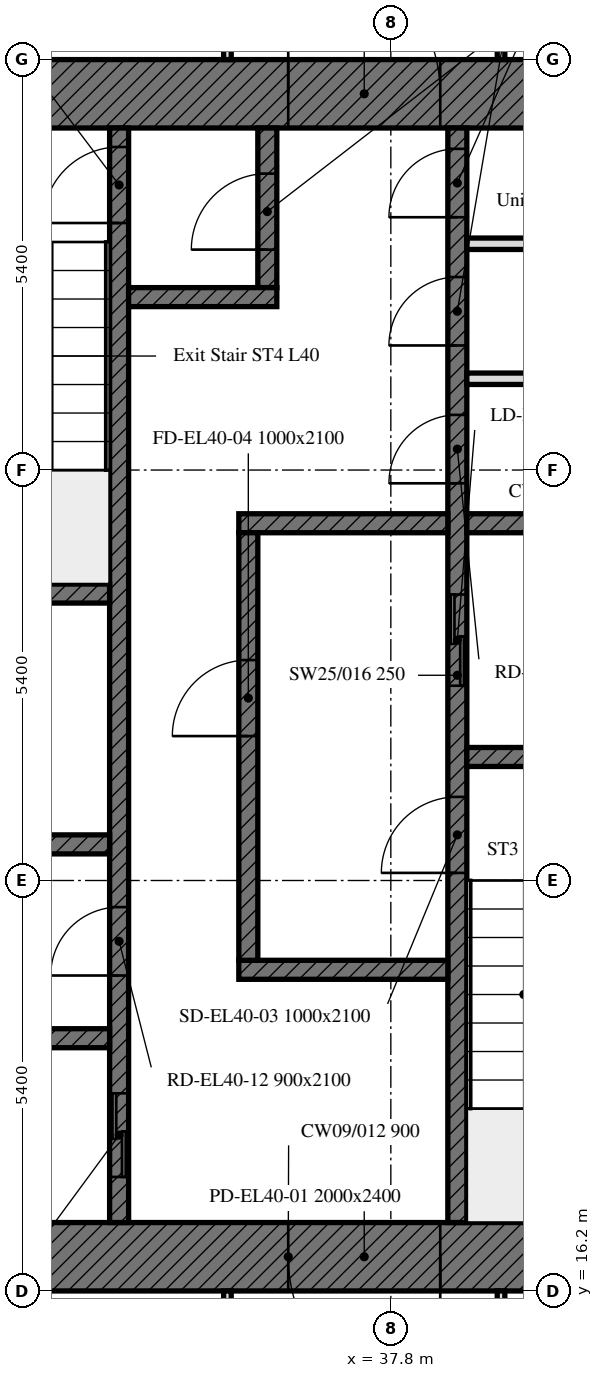
"""IFC4 building model, lengths in metres.
Left out: names, types, materials, properties, quantities, classifications, styles, units other than length and angle.
Written with IfcOpenShell. Run it as: python <this file> out.ifc"""

import sys

from ifc_helpers import new_model, si_unit, direction, frame, frame_2d, origin, place, context, subcontext, project, spatial, rectangle, extrude, element, fill, save


model = new_model("IFC4")
c1 = context("Model", 3, precision=1e-05, world=origin(), true_north=direction((0.0, 1.0)))
c2 = subcontext(c1, "Body", "Model", "MODEL_VIEW")
j1 = project(units=[si_unit("LENGTHUNIT", "METRE"), si_unit("PLANEANGLEUNIT", "RADIAN")], contexts=[c1])
p1 = place(None, origin())
s1 = spatial("IfcSite", under=j1, at=p1, CompositionType="ELEMENT")
p2 = place(p1, origin())
s2 = spatial("IfcBuilding", under=s1, at=p2, CompositionType="ELEMENT")
p3 = place(p2, frame((0.0, 0.0, 169.3)))
s3 = spatial("IfcBuildingStorey", under=s2, at=p3, CompositionType="ELEMENT", Elevation=169.3)
p4 = place(p3, frame((42.0, 16.65, 0.0), z_axis=(0.0, 0.0, 1.0), x_axis=(-1.0, 0.0, 0.0)))
e1 = element("IfcWall", 1, at=p4, inside=s3, PredefinedType="SOLIDWALL", context=c2, shape_type="SweptSolid", body=[
    extrude(rectangle(XDim=11.1, YDim=0.9, at=frame_2d((5.55, 0.0))), origin(), (0.0, 0.0, 1.0), 3.0),
])
p5 = place(p4, frame((3.55, 0.0, 0.0)))
e2 = element("IfcOpeningElement", 2, at=p5, cuts=e1, PredefinedType="OPENING", context=c2, shape_type="SweptSolid", body=[
    extrude(rectangle(XDim=2.0, YDim=2.4, at=frame_2d((1.0, 1.2))), frame((0.0, 0.45, 0.0), z_axis=(0.0, -1.0, 0.0), x_axis=(1.0, 0.0, 0.0)), (0.0, 0.0, 1.0), 0.9),
])
p6 = place(p3, frame((30.9, 31.95, 0.0), z_axis=(0.0, 0.0, 1.0), x_axis=(1.0, 0.0, 0.0)))
e3 = element("IfcWall", 3, at=p6, inside=s3, PredefinedType="SOLIDWALL", context=c2, shape_type="SweptSolid", body=[
    extrude(rectangle(XDim=11.1, YDim=0.9, at=frame_2d((5.55, 0.0))), origin(), (0.0, 0.0, 1.0), 3.0),
])
p7 = place(p6, frame((5.55, 0.0, 0.0)))
e4 = element("IfcOpeningElement", 4, at=p7, cuts=e3, PredefinedType="OPENING", context=c2, shape_type="SweptSolid", body=[
    extrude(rectangle(XDim=2.0, YDim=2.4, at=frame_2d((1.0, 1.2))), frame((0.0, 0.45, 0.0), z_axis=(0.0, -1.0, 0.0), x_axis=(1.0, 0.0, 0.0)), (0.0, 0.0, 1.0), 0.9),
])
p8 = place(p3, frame((38.675, 17.1, 0.0), z_axis=(0.0, 0.0, 1.0), x_axis=(0.0, 1.0, 0.0)))
e5 = element("IfcWall", 5, at=p8, inside=s3, PredefinedType="SOLIDWALL", context=c2, shape_type="SweptSolid", body=[
    extrude(rectangle(XDim=14.4, YDim=0.25, at=frame_2d((7.2, 0.0))), origin(), (0.0, 0.0, 1.0), 3.0),
])
p9 = place(p8, frame((4.6, 0.0, 0.0)))
e6 = element("IfcOpeningElement", 6, at=p9, cuts=e5, PredefinedType="OPENING", context=c2, shape_type="SweptSolid", body=[
    extrude(rectangle(XDim=1.0, YDim=2.1, at=frame_2d((0.5, 1.05))), frame((0.0, 0.125, 0.0), z_axis=(0.0, -1.0, 0.0), x_axis=(1.0, 0.0, 0.0)), (0.0, 0.0, 1.0), 0.25),
])
p10 = place(p8, frame((7.062, 0.0, 0.0)))
e7 = element("IfcOpeningElement", 7, at=p10, cuts=e5, PredefinedType="OPENING", context=c2, shape_type="SweptSolid", body=[
    extrude(rectangle(XDim=1.2, YDim=2.1, at=frame_2d((0.6, 1.05))), frame((0.0, 0.125, 0.0), z_axis=(0.0, -1.0, 0.0), x_axis=(1.0, 0.0, 0.0)), (0.0, 0.0, 1.0), 0.25),
])
p11 = place(p8, frame((9.726, 0.0, 0.0)))
e8 = element("IfcOpeningElement", 8, at=p11, cuts=e5, PredefinedType="OPENING", context=c2, shape_type="SweptSolid", body=[
    extrude(rectangle(XDim=0.9, YDim=2.1, at=frame_2d((0.45, 1.05))), frame((0.0, 0.125, 0.0), z_axis=(0.0, -1.0, 0.0), x_axis=(1.0, 0.0, 0.0)), (0.0, 0.0, 1.0), 0.25),
])
p12 = place(p8, frame((11.539, 0.0, 0.0)))
e9 = element("IfcOpeningElement", 9, at=p12, cuts=e5, PredefinedType="OPENING", context=c2, shape_type="SweptSolid", body=[
    extrude(rectangle(XDim=0.9, YDim=2.1, at=frame_2d((0.45, 1.05))), frame((0.0, 0.125, 0.0), z_axis=(0.0, -1.0, 0.0), x_axis=(1.0, 0.0, 0.0)), (0.0, 0.0, 1.0), 0.25),
])
p13 = place(p8, frame((13.226, 0.0, 0.0)))
e10 = element("IfcOpeningElement", 10, at=p13, cuts=e5, PredefinedType="OPENING", context=c2, shape_type="SweptSolid", body=[
    extrude(rectangle(XDim=0.9, YDim=2.1, at=frame_2d((0.45, 1.05))), frame((0.0, 0.125, 0.0), z_axis=(0.0, -1.0, 0.0), x_axis=(1.0, 0.0, 0.0)), (0.0, 0.0, 1.0), 0.25),
])
p14 = place(p3, frame((34.225, 17.1, 0.0), z_axis=(0.0, 0.0, 1.0), x_axis=(0.0, 1.0, 0.0)))
e11 = element("IfcWall", 11, at=p14, inside=s3, PredefinedType="SOLIDWALL", context=c2, shape_type="SweptSolid", body=[
    extrude(rectangle(XDim=14.4, YDim=0.25, at=frame_2d((7.2, 0.0))), origin(), (0.0, 0.0, 1.0), 3.0),
])
p15 = place(p14, frame((13.15, 0.0, 0.0)))
e12 = element("IfcOpeningElement", 12, at=p15, cuts=e11, PredefinedType="OPENING", context=c2, shape_type="SweptSolid", body=[
    extrude(rectangle(XDim=1.0, YDim=2.1, at=frame_2d((0.5, 1.05))), frame((0.0, 0.125, 0.0), z_axis=(0.0, -1.0, 0.0), x_axis=(1.0, 0.0, 0.0)), (0.0, 0.0, 1.0), 0.25),
])
p16 = place(p14, frame((0.6, 0.0, 0.0)))
e13 = element("IfcOpeningElement", 13, at=p16, cuts=e11, PredefinedType="OPENING", context=c2, shape_type="SweptSolid", body=[
    extrude(rectangle(XDim=1.1, YDim=2.1, at=frame_2d((0.55, 1.05))), frame((0.0, 0.125, 0.0), z_axis=(0.0, -1.0, 0.0), x_axis=(1.0, 0.0, 0.0)), (0.0, 0.0, 1.0), 0.25),
])
p17 = place(p14, frame((3.25, 0.0, 0.0)))
e14 = element("IfcOpeningElement", 14, at=p17, cuts=e11, PredefinedType="OPENING", context=c2, shape_type="SweptSolid", body=[
    extrude(rectangle(XDim=0.9, YDim=2.1, at=frame_2d((0.45, 1.05))), frame((0.0, 0.125, 0.0), z_axis=(0.0, -1.0, 0.0), x_axis=(1.0, 0.0, 0.0)), (0.0, 0.0, 1.0), 0.25),
])
p18 = place(p3, frame((38.8, 23.225, 0.0), z_axis=(0.0, 0.0, 1.0), x_axis=(1.0, 0.0, 0.0)))
e15 = element("IfcWall", 15, at=p18, inside=s3, PredefinedType="SOLIDWALL", context=c2, shape_type="SweptSolid", body=[
    extrude(rectangle(XDim=3.2, YDim=0.25, at=frame_2d((1.6, 0.0))), origin(), (0.0, 0.0, 1.0), 3.0),
])
for number, where, z_axis, x_axis in (
    (16, (30.9, 25.375, 0.0), (0.0, 0.0, 1.0), (1.0, 0.0, 0.0)),
    (17, (30.9, 22.075, 0.0), (0.0, 0.0, 1.0), (1.0, 0.0, 0.0)),
):
    element("IfcWall", number, at=place(p3, frame(where, z_axis=z_axis, x_axis=x_axis)), inside=s3, PredefinedType="SOLIDWALL", context=c2, shape_type="SweptSolid", body=[
        extrude(rectangle(XDim=3.2, YDim=0.25, at=frame_2d((1.6, 0.0))), origin(), (0.0, 0.0, 1.0), 3.0),
    ])
p19 = place(p3, frame((38.8, 26.3, 0.0), z_axis=(0.0, 0.0, 1.0), x_axis=(1.0, 0.0, 0.0)))
e18 = element("IfcWall", 18, at=p19, inside=s3, PredefinedType="SOLIDWALL", context=c2, shape_type="SweptSolid", body=[
    extrude(rectangle(XDim=3.2, YDim=0.25, at=frame_2d((1.6, 0.0))), origin(), (0.0, 0.0, 1.0), 3.0),
])
for number, where, z_axis, x_axis in (
    (19, (35.8, 26.3, 0.0), (0.0, 0.0, 1.0), (1.0, 0.0, 0.0)),
    (20, (35.8, 20.425, 0.0), (0.0, 0.0, 1.0), (1.0, 0.0, 0.0)),
):
    element("IfcWall", number, at=place(p3, frame(where, z_axis=z_axis, x_axis=x_axis)), inside=s3, PredefinedType="SOLIDWALL", context=c2, shape_type="SweptSolid", body=[
        extrude(rectangle(XDim=2.75, YDim=0.25, at=frame_2d((1.375, 0.0))), origin(), (0.0, 0.0, 1.0), 3.0),
    ])
p20 = place(p3, frame((36.175, 29.4, 0.0), z_axis=(0.0, 0.0, 1.0), x_axis=(0.0, 1.0, 0.0)))
e21 = element("IfcWall", 21, at=p20, inside=s3, PredefinedType="SOLIDWALL", context=c2, shape_type="SweptSolid", body=[
    extrude(rectangle(XDim=2.1, YDim=0.25, at=frame_2d((1.05, 0.0))), origin(), (0.0, 0.0, 1.0), 3.0),
])
p21 = place(p20, frame((0.5, 0.0, 0.0)))
e22 = element("IfcOpeningElement", 22, at=p21, cuts=e21, PredefinedType="OPENING", context=c2, shape_type="SweptSolid", body=[
    extrude(rectangle(XDim=1.0, YDim=2.1, at=frame_2d((0.5, 1.05))), frame((0.0, 0.125, 0.0), z_axis=(0.0, -1.0, 0.0), x_axis=(1.0, 0.0, 0.0)), (0.0, 0.0, 1.0), 0.25),
])
p22 = place(p3, frame((34.35, 29.275, 0.0), z_axis=(0.0, 0.0, 1.0), x_axis=(1.0, 0.0, 0.0)))
e23 = element("IfcWall", 23, at=p22, inside=s3, PredefinedType="SOLIDWALL", context=c2, shape_type="SweptSolid", body=[
    extrude(rectangle(XDim=1.95, YDim=0.25, at=frame_2d((0.975, 0.0))), origin(), (0.0, 0.0, 1.0), 3.0),
])
p23 = place(p3, frame((35.925, 20.55, 0.0), z_axis=(0.0, 0.0, 1.0), x_axis=(0.0, 1.0, 0.0)))
e24 = element("IfcWall", 24, at=p23, inside=s3, PredefinedType="SOLIDWALL", context=c2, shape_type="SweptSolid", body=[
    extrude(rectangle(XDim=5.625, YDim=0.25, at=frame_2d((2.812, 0.0))), origin(), (0.0, 0.0, 1.0), 3.0),
])
p24 = place(p23, frame((2.95, 0.0, 0.0)))
e25 = element("IfcOpeningElement", 25, at=p24, cuts=e24, PredefinedType="OPENING", context=c2, shape_type="SweptSolid", body=[
    extrude(rectangle(XDim=1.0, YDim=2.1, at=frame_2d((0.5, 1.05))), frame((0.0, 0.125, 0.0), z_axis=(0.0, -1.0, 0.0), x_axis=(1.0, 0.0, 0.0)), (0.0, 0.0, 1.0), 0.25),
])
p25 = place(p3, frame((30.9, 19.525, 0.0), z_axis=(0.0, 0.0, 1.0), x_axis=(1.0, 0.0, 0.0)))
e26 = element("IfcWall", 26, at=p25, inside=s3, PredefinedType="SOLIDWALL", context=c2, shape_type="SweptSolid", body=[
    extrude(rectangle(XDim=3.2, YDim=0.25, at=frame_2d((1.6, 0.0))), origin(), (0.0, 0.0, 1.0), 3.0),
])
for number, where, z_axis, x_axis in (
    (27, (38.8, 28.201, 0.0), (0.0, 0.0, 1.0), (1.0, 0.0, 0.0)),
    (28, (38.8, 29.977, 0.0), (0.0, 0.0, 1.0), (1.0, 0.0, 0.0)),
):
    element("IfcWall", number, at=place(p3, frame(where, z_axis=z_axis, x_axis=x_axis)), inside=s3, PredefinedType="PARTITIONING", context=c2, shape_type="SweptSolid", body=[
        extrude(rectangle(XDim=3.2, YDim=0.15, at=frame_2d((1.6, 0.0))), origin(), (0.0, 0.0, 1.0), 3.0),
    ])
for number, where, z_axis, x_axis in (
    (29, (35.65, 35.475, 0.0), (0.0, 0.0, 1.0), (0.0, -1.0, 0.0)),
    (30, (39.25, 32.4, 0.0), (0.0, 0.0, 1.0), (0.0, 1.0, 0.0)),
):
    element("IfcWall", number, at=place(p3, frame(where, z_axis=z_axis, x_axis=x_axis)), inside=s3, PredefinedType="PARTITIONING", context=c2, shape_type="SweptSolid", body=[
        extrude(rectangle(XDim=3.075, YDim=0.1, at=frame_2d((1.538, 0.0))), origin(), (0.0, 0.0, 1.0), 3.0),
    ])
for number, where, z_axis, x_axis in (
    (31, (35.65, 16.2, 0.0), (0.0, 0.0, 1.0), (0.0, -1.0, 0.0)),
    (32, (39.25, 9.975, 0.0), (0.0, 0.0, 1.0), (0.0, 1.0, 0.0)),
):
    element("IfcWall", number, at=place(p3, frame(where, z_axis=z_axis, x_axis=x_axis)), inside=s3, PredefinedType="PARTITIONING", context=c2, shape_type="SweptSolid", body=[
        extrude(rectangle(XDim=6.225, YDim=0.1, at=frame_2d((3.112, 0.0))), origin(), (0.0, 0.0, 1.0), 2.4),
    ])
p26 = place(p5, origin())
e33 = element("IfcDoor", 33, at=p26, inside=s3, OperationType="DOUBLE_DOOR_SINGLE_SWING", PredefinedType="DOOR", context=c2, shape_type="SweptSolid", body=[
    extrude(rectangle(XDim=2.0, YDim=2.4, at=frame_2d((1.0, 1.2))), frame((0.0, 0.025, 0.0), z_axis=(0.0, -1.0, 0.0), x_axis=(1.0, 0.0, 0.0)), (0.0, 0.0, 1.0), 0.05),
])
fill(e2, e33)
p27 = place(p7, origin())
e34 = element("IfcDoor", 34, at=p27, inside=s3, OperationType="DOUBLE_DOOR_SINGLE_SWING", PredefinedType="DOOR", context=c2, shape_type="SweptSolid", body=[
    extrude(rectangle(XDim=2.0, YDim=2.4, at=frame_2d((1.0, 1.2))), frame((0.0, 0.025, 0.0), z_axis=(0.0, -1.0, 0.0), x_axis=(1.0, 0.0, 0.0)), (0.0, 0.0, 1.0), 0.05),
])
fill(e4, e34)
p28 = place(p9, origin())
e35 = element("IfcDoor", 35, at=p28, inside=s3, OperationType="SINGLE_SWING_LEFT", PredefinedType="DOOR", context=c2, shape_type="SweptSolid", body=[
    extrude(rectangle(XDim=1.0, YDim=2.1, at=frame_2d((0.5, 1.05))), frame((0.0, 0.025, 0.0), z_axis=(0.0, -1.0, 0.0), x_axis=(1.0, 0.0, 0.0)), (0.0, 0.0, 1.0), 0.05),
])
fill(e6, e35)
p29 = place(p24, origin())
e36 = element("IfcDoor", 36, at=p29, inside=s3, OperationType="SINGLE_SWING_LEFT", PredefinedType="DOOR", context=c2, shape_type="SweptSolid", body=[
    extrude(rectangle(XDim=1.0, YDim=2.1, at=frame_2d((0.5, 1.05))), frame((0.0, 0.025, 0.0), z_axis=(0.0, -1.0, 0.0), x_axis=(1.0, 0.0, 0.0)), (0.0, 0.0, 1.0), 0.05),
])
fill(e25, e36)
p30 = place(p15, origin())
e37 = element("IfcDoor", 37, at=p30, inside=s3, OperationType="SINGLE_SWING_LEFT", PredefinedType="DOOR", context=c2, shape_type="SweptSolid", body=[
    extrude(rectangle(XDim=1.0, YDim=2.1, at=frame_2d((0.5, 1.05))), frame((0.0, 0.025, 0.0), z_axis=(0.0, -1.0, 0.0), x_axis=(1.0, 0.0, 0.0)), (0.0, 0.0, 1.0), 0.05),
])
fill(e12, e37)
p31 = place(p21, origin())
e38 = element("IfcDoor", 38, at=p31, inside=s3, OperationType="SINGLE_SWING_LEFT", PredefinedType="DOOR", context=c2, shape_type="SweptSolid", body=[
    extrude(rectangle(XDim=1.0, YDim=2.1, at=frame_2d((0.5, 1.05))), frame((0.0, 0.025, 0.0), z_axis=(0.0, -1.0, 0.0), x_axis=(1.0, 0.0, 0.0)), (0.0, 0.0, 1.0), 0.05),
])
fill(e22, e38)
p32 = place(p10, origin())
e39 = element("IfcDoor", 39, at=p32, inside=s3, OperationType="DOUBLE_DOOR_SLIDING", PredefinedType="DOOR", context=c2, shape_type="SweptSolid", body=[
    extrude(rectangle(XDim=1.2, YDim=2.1, at=frame_2d((0.6, 1.05))), frame((0.0, 0.025, 0.0), z_axis=(0.0, -1.0, 0.0), x_axis=(1.0, 0.0, 0.0)), (0.0, 0.0, 1.0), 0.05),
])
fill(e7, e39)
p33 = place(p16, origin())
e40 = element("IfcDoor", 40, at=p33, inside=s3, OperationType="DOUBLE_DOOR_SLIDING", PredefinedType="DOOR", context=c2, shape_type="SweptSolid", body=[
    extrude(rectangle(XDim=1.1, YDim=2.1, at=frame_2d((0.55, 1.05))), frame((0.0, 0.025, 0.0), z_axis=(0.0, -1.0, 0.0), x_axis=(1.0, 0.0, 0.0)), (0.0, 0.0, 1.0), 0.05),
])
fill(e13, e40)
p34 = place(p11, origin())
e41 = element("IfcDoor", 41, at=p34, inside=s3, OperationType="SINGLE_SWING_LEFT", PredefinedType="DOOR", context=c2, shape_type="SweptSolid", body=[
    extrude(rectangle(XDim=0.9, YDim=2.1, at=frame_2d((0.45, 1.05))), frame((0.0, 0.025, 0.0), z_axis=(0.0, -1.0, 0.0), x_axis=(1.0, 0.0, 0.0)), (0.0, 0.0, 1.0), 0.05),
])
fill(e8, e41)
p35 = place(p12, origin())
e42 = element("IfcDoor", 42, at=p35, inside=s3, OperationType="SINGLE_SWING_LEFT", PredefinedType="DOOR", context=c2, shape_type="SweptSolid", body=[
    extrude(rectangle(XDim=0.9, YDim=2.1, at=frame_2d((0.45, 1.05))), frame((0.0, 0.025, 0.0), z_axis=(0.0, -1.0, 0.0), x_axis=(1.0, 0.0, 0.0)), (0.0, 0.0, 1.0), 0.05),
])
fill(e9, e42)
p36 = place(p13, origin())
e43 = element("IfcDoor", 43, at=p36, inside=s3, OperationType="SINGLE_SWING_LEFT", PredefinedType="DOOR", context=c2, shape_type="SweptSolid", body=[
    extrude(rectangle(XDim=0.9, YDim=2.1, at=frame_2d((0.45, 1.05))), frame((0.0, 0.025, 0.0), z_axis=(0.0, -1.0, 0.0), x_axis=(1.0, 0.0, 0.0)), (0.0, 0.0, 1.0), 0.05),
])
fill(e10, e43)
p37 = place(p17, origin())
e44 = element("IfcDoor", 44, at=p37, inside=s3, OperationType="SINGLE_SWING_LEFT", PredefinedType="DOOR", context=c2, shape_type="SweptSolid", body=[
    extrude(rectangle(XDim=0.9, YDim=2.1, at=frame_2d((0.45, 1.05))), frame((0.0, 0.025, 0.0), z_axis=(0.0, -1.0, 0.0), x_axis=(1.0, 0.0, 0.0)), (0.0, 0.0, 1.0), 0.05),
])
fill(e14, e44)
save(model, sys.argv[1])
